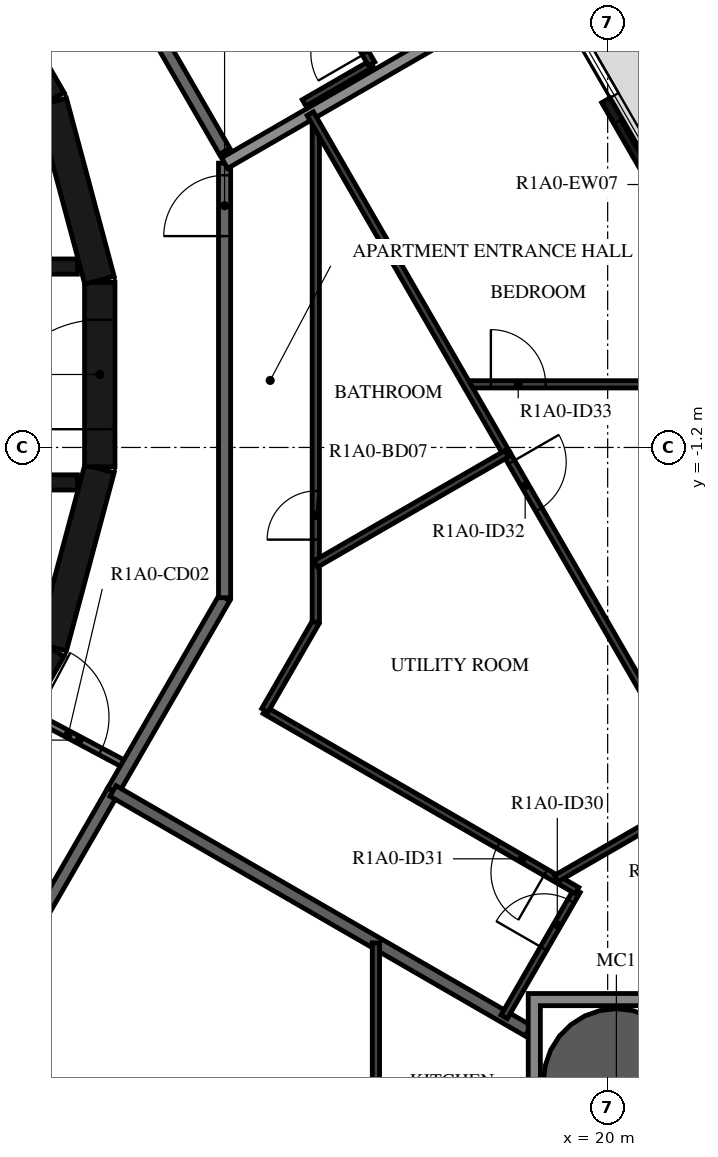
"""IFC4 building model, lengths in metres.
Left out: names, types, materials, properties, quantities, classifications, styles, units other than length and angle.
Written with IfcOpenShell. Run it as: python <this file> out.ifc"""

import sys

from ifc_helpers import new_model, si_unit, direction, frame, frame_2d, origin, origin_2d, place, context, subcontext, project, spatial, polyline, rectangle, hollow_circle, outline, extrude, element, fill, save


model = new_model("IFC4")
c1 = context("Model", 3, precision=1e-05, world=origin(), true_north=direction((0.0, 1.0)))
c2 = subcontext(c1, "Body", "Model", "MODEL_VIEW")
j1 = project(units=[si_unit("LENGTHUNIT", "METRE"), si_unit("PLANEANGLEUNIT", "RADIAN")], contexts=[c1])
p1 = place(None, origin())
s1 = spatial("IfcSite", under=j1, at=p1, CompositionType="ELEMENT")
p2 = place(p1, origin())
s2 = spatial("IfcBuilding", under=s1, at=p2, CompositionType="ELEMENT")
p3 = place(p2, frame((0.0, 0.0, 45.4)))
s3 = spatial("IfcBuildingStorey", under=s2, at=p3, CompositionType="ELEMENT", Elevation=45.4)
p4 = place(p3, frame((20.144, -11.63, -0.38), z_axis=(0.0, 0.0, 1.0), x_axis=(1.0, 0.0, 0.0)))
e1 = element("IfcColumn", 1, at=p4, inside=s3, PredefinedType="COLUMN", context=c2, shape_type="SweptSolid", body=[
    extrude(hollow_circle(Radius=1.2, WallThickness=0.06, at=origin_2d()), origin(), (0.0, 0.0, 1.0), 3.5),
])
p5 = place(p3, frame((21.571, 1.738, 0.0), z_axis=(0.0, 0.0, 1.0), x_axis=(-0.500028443584, 0.866008981251, 0.0)))
e2 = element("IfcWall", 2, at=p5, inside=s3, PredefinedType="STANDARD", context=c2, shape_type="SweptSolid", body=[
    extrude(rectangle(XDim=3.2, YDim=0.16, at=frame_2d((1.6, 0.0))), origin(), (0.0, 0.0, 1.0), 3.12),
])
p6 = place(p5, frame((0.4, 0.0, 0.0)))
e3 = element("IfcOpeningElement", 3, at=p6, cuts=e2, PredefinedType="OPENING", context=c2, shape_type="SweptSolid", body=[
    extrude(rectangle(XDim=2.4, YDim=2.4, at=frame_2d((1.2, 1.2))), frame((0.0, 0.09, 0.0), z_axis=(0.0, -1.0, 0.0), x_axis=(1.0, 0.0, 0.0)), (0.0, 0.0, 1.0), 0.18),
])
for number, where, z_axis, x_axis in (
    (4, (9.329, -7.137, 0.0), (0.0, 0.0, 1.0), (0.5, 0.866, 0.0)),
    (5, (10.858, -4.479, 0.0), (0.0, 0.0, 1.0), (0.259, 0.966, 0.0)),
):
    element("IfcWall", number, at=place(p3, frame(where, z_axis=z_axis, x_axis=x_axis)), inside=s3, PredefinedType="SHEAR", context=c2, shape_type="SweptSolid", body=[
        extrude(rectangle(XDim=3.033, YDim=0.5, at=frame_2d((1.516, 0.0))), origin(), (0.0, 0.0, 1.0), 3.12),
    ])
p7 = place(p3, frame((11.647, -1.516, 0.0), z_axis=(0.0, 0.0, 1.0), x_axis=(0.0, 1.0, 0.0)))
e6 = element("IfcWall", 6, at=p7, inside=s3, PredefinedType="SHEAR", context=c2, shape_type="SweptSolid", body=[
    extrude(rectangle(XDim=3.033, YDim=0.5, at=frame_2d((1.516, 0.0))), origin(), (0.0, 0.0, 1.0), 3.12),
])
p8 = place(p7, frame((0.616, 0.0, 0.0)))
e7 = element("IfcOpeningElement", 7, at=p8, cuts=e6, PredefinedType="OPENING", context=c2, shape_type="SweptSolid", body=[
    extrude(rectangle(XDim=1.8, YDim=2.1, at=frame_2d((0.9, 1.05))), frame((0.0, 0.26, 0.0), z_axis=(0.0, -1.0, 0.0), x_axis=(1.0, 0.0, 0.0)), (0.0, 0.0, 1.0), 0.52),
])
for number, where, z_axis, x_axis in (
    (8, (11.643, 1.55, 0.0), (0.0, 0.0, 1.0), (-0.259, 0.966, 0.0)),
    (9, (10.845, 4.51, 0.0), (0.0, 0.0, 1.0), (-0.5, 0.866, 0.0)),
):
    element("IfcWall", number, at=place(p3, frame(where, z_axis=z_axis, x_axis=x_axis)), inside=s3, PredefinedType="SHEAR", context=c2, shape_type="SweptSolid", body=[
        extrude(rectangle(XDim=3.033, YDim=0.5, at=frame_2d((1.516, 0.0))), origin(), (0.0, 0.0, 1.0), 3.12),
    ])
p9 = place(p3, frame((3.35, 1.775, 0.0), z_axis=(0.0, 0.0, 1.0), x_axis=(1.0, 0.0, 0.0)))
e10 = element("IfcWall", 10, at=p9, inside=s3, PredefinedType="SHEAR", context=c2, shape_type="SweptSolid", body=[
    extrude(rectangle(XDim=7.93, YDim=0.25, at=frame_2d((3.965, 0.0))), origin(), (0.0, 0.0, 1.0), 3.12),
])
p10 = place(p9, frame((0.35, 0.0, 0.0)))
e11 = element("IfcOpeningElement", 11, at=p10, cuts=e10, PredefinedType="OPENING", context=c2, shape_type="SweptSolid", body=[
    extrude(rectangle(XDim=1.2, YDim=2.4, at=frame_2d((0.6, 1.2))), frame((0.0, 0.135, 0.0), z_axis=(0.0, -1.0, 0.0), x_axis=(1.0, 0.0, 0.0)), (0.0, 0.0, 1.0), 0.27),
])
p11 = place(p9, frame((2.5, 0.0, 0.0)))
e12 = element("IfcOpeningElement", 12, at=p11, cuts=e10, PredefinedType="OPENING", context=c2, shape_type="SweptSolid", body=[
    extrude(rectangle(XDim=1.2, YDim=2.4, at=frame_2d((0.6, 1.2))), frame((0.0, 0.135, 0.0), z_axis=(0.0, -1.0, 0.0), x_axis=(1.0, 0.0, 0.0)), (0.0, 0.0, 1.0), 0.27),
])
p12 = place(p9, frame((4.8, 0.0, 0.0)))
e13 = element("IfcOpeningElement", 13, at=p12, cuts=e10, PredefinedType="OPENING", context=c2, shape_type="SweptSolid", body=[
    extrude(rectangle(XDim=0.9, YDim=2.1, at=frame_2d((0.45, 1.05))), frame((0.0, 0.135, 0.0), z_axis=(0.0, -1.0, 0.0), x_axis=(1.0, 0.0, 0.0)), (0.0, 0.0, 1.0), 0.27),
])
p13 = place(p3, frame((3.35, -1.775, 0.0), z_axis=(0.0, 0.0, 1.0), x_axis=(1.0, 0.0, 0.0)))
e14 = element("IfcWall", 14, at=p13, inside=s3, PredefinedType="SHEAR", context=c2, shape_type="SweptSolid", body=[
    extrude(rectangle(XDim=7.93, YDim=0.25, at=frame_2d((3.965, 0.0))), origin(), (0.0, 0.0, 1.0), 3.12),
])
p14 = place(p13, frame((0.4, 0.0, 0.0)))
e15 = element("IfcOpeningElement", 15, at=p14, cuts=e14, PredefinedType="OPENING", context=c2, shape_type="SweptSolid", body=[
    extrude(rectangle(XDim=1.1, YDim=2.4, at=frame_2d((0.55, 1.2))), frame((0.0, 0.135, 0.0), z_axis=(0.0, -1.0, 0.0), x_axis=(1.0, 0.0, 0.0)), (0.0, 0.0, 1.0), 0.27),
])
p15 = place(p13, frame((2.55, 0.0, 0.0)))
e16 = element("IfcOpeningElement", 16, at=p15, cuts=e14, PredefinedType="OPENING", context=c2, shape_type="SweptSolid", body=[
    extrude(rectangle(XDim=1.1, YDim=2.4, at=frame_2d((0.55, 1.2))), frame((0.0, 0.135, 0.0), z_axis=(0.0, -1.0, 0.0), x_axis=(1.0, 0.0, 0.0)), (0.0, 0.0, 1.0), 0.27),
])
p16 = place(p13, frame((4.7, 0.0, 0.0)))
e17 = element("IfcOpeningElement", 17, at=p16, cuts=e14, PredefinedType="OPENING", context=c2, shape_type="SweptSolid", body=[
    extrude(rectangle(XDim=1.1, YDim=2.4, at=frame_2d((0.55, 1.2))), frame((0.0, 0.135, 0.0), z_axis=(0.0, -1.0, 0.0), x_axis=(1.0, 0.0, 0.0)), (0.0, 0.0, 1.0), 0.27),
])
p17 = place(p3, frame((10.511, -5.589, 0.0), z_axis=(0.0, 0.0, 1.0), x_axis=(0.88294043061, -0.469485032769, 0.0)))
e18 = element("IfcWall", 18, at=p17, inside=s3, PredefinedType="PARTITIONING", context=c2, shape_type="SweptSolid", body=[
    extrude(rectangle(XDim=1.804, YDim=0.12, at=frame_2d((0.902, 0.0))), origin(), (0.0, 0.0, 1.0), 3.12),
])
p18 = place(p17, frame((0.1, 0.0, 0.0)))
e19 = element("IfcOpeningElement", 19, at=p18, cuts=e18, PredefinedType="OPENING", context=c2, shape_type="SweptSolid", body=[
    extrude(rectangle(XDim=1.2, YDim=2.1, at=frame_2d((0.6, 1.05))), frame((0.0, 0.07, 0.0), z_axis=(0.0, -1.0, 0.0), x_axis=(1.0, 0.0, 0.0)), (0.0, 0.0, 1.0), 0.14),
])
p19 = place(p3, frame((13.7, 3.671, 0.0), z_axis=(0.0, 0.0, 1.0), x_axis=(-0.500001669485, 0.866024439905, 0.0)))
e20 = element("IfcWall", 20, at=p19, inside=s3, PredefinedType="STANDARD", context=c2, shape_type="SweptSolid", body=[
    extrude(rectangle(XDim=7.342, YDim=0.2, at=frame_2d((3.671, 0.0))), origin(), (0.0, 0.0, 1.0), 3.12),
])
p20 = place(p19, frame((6.142, 0.0, 0.0)))
e21 = element("IfcOpeningElement", 21, at=p20, cuts=e20, PredefinedType="OPENING", context=c2, shape_type="SweptSolid", body=[
    extrude(rectangle(XDim=1.0, YDim=2.1, at=frame_2d((0.5, 1.05))), frame((0.0, 0.11, 0.0), z_axis=(0.0, -1.0, 0.0), x_axis=(1.0, 0.0, 0.0)), (0.0, 0.0, 1.0), 0.22),
])
p21 = place(p3, frame((11.865, -6.849, 0.0), z_axis=(0.0, 0.0, 1.0), x_axis=(0.500002704028, 0.866023842607, 0.0)))
e22 = element("IfcWall", 22, at=p21, inside=s3, PredefinedType="STANDARD", context=c2, shape_type="SweptSolid", body=[
    extrude(rectangle(XDim=3.67, YDim=0.2, at=frame_2d((1.835, 0.0))), origin(), (0.0, 0.0, 1.0), 3.12),
])
p22 = place(p3, frame((13.7, -3.671, 0.0), z_axis=(0.0, 0.0, 1.0), x_axis=(0.0, 1.0, 0.0)))
e23 = element("IfcWall", 23, at=p22, inside=s3, PredefinedType="STANDARD", context=c2, shape_type="SweptSolid", body=[
    extrude(rectangle(XDim=7.146, YDim=0.2, at=frame_2d((3.573, 0.0))), origin(), (0.0, 0.0, 1.0), 3.12),
])
p23 = place(p22, frame((5.947, 0.0, 0.0)))
e24 = element("IfcOpeningElement", 24, at=p23, cuts=e23, PredefinedType="OPENING", context=c2, shape_type="SweptSolid", body=[
    extrude(rectangle(XDim=1.0, YDim=2.1, at=frame_2d((0.5, 1.05))), frame((0.0, 0.11, 0.0), z_axis=(0.0, -1.0, 0.0), x_axis=(1.0, 0.0, 0.0)), (0.0, 0.0, 1.0), 0.22),
])
p24 = place(p3, frame((10.029, -10.029, 0.0), z_axis=(0.0, 0.0, 1.0), x_axis=(0.50001606911, 0.866016126081, 0.0)))
e25 = element("IfcWall", 25, at=p24, inside=s3, PredefinedType="STANDARD", context=c2, shape_type="SweptSolid", body=[
    extrude(rectangle(XDim=3.671, YDim=0.2, at=frame_2d((1.835, 0.0))), origin(), (0.0, 0.0, 1.0), 3.12),
])
p25 = place(p3, frame((13.7, 3.476, 0.0), z_axis=(0.0, 0.0, 1.0), x_axis=(0.866013584312, 0.500020471368, 0.0)))
e26 = element("IfcWall", 26, at=p25, inside=s3, PredefinedType="STANDARD", context=c2, shape_type="SweptSolid", body=[
    extrude(rectangle(XDim=6.028, YDim=0.2, at=frame_2d((3.014, 0.0))), origin(), (0.0, 0.0, 1.0), 2.73),
])
p26 = place(p3, frame((18.694, -10.793, 0.0), z_axis=(0.0, 0.0, 1.0), x_axis=(-0.865964895271, 0.500104789178, 0.0)))
e27 = element("IfcWall", 27, at=p26, inside=s3, PredefinedType="STANDARD", context=c2, shape_type="SweptSolid", body=[
    extrude(rectangle(XDim=7.885, YDim=0.2, at=frame_2d((3.943, 0.0))), origin(), (0.0, 0.0, 1.0), 3.12),
])
p27 = place(p3, frame((15.007, 4.467, 0.0), z_axis=(0.0, 0.0, 1.0), x_axis=(0.86599869919, 0.500046250861, 0.0)))
e28 = element("IfcWall", 28, at=p27, inside=s3, PredefinedType="PARTITIONING", context=c2, shape_type="SweptSolid", body=[
    extrude(rectangle(XDim=1.284, YDim=0.12, at=frame_2d((0.642, 0.0))), origin(), (0.0, 0.0, 1.0), 3.12),
])
p28 = place(p3, frame((16.119, 5.109, 0.0), z_axis=(0.0, 0.0, 1.0), x_axis=(-0.499988222896, 0.866032203192, 0.0)))
e29 = element("IfcWall", 29, at=p28, inside=s3, PredefinedType="PARTITIONING", context=c2, shape_type="SweptSolid", body=[
    extrude(rectangle(XDim=4.4, YDim=0.12, at=frame_2d((2.2, 0.0))), origin(), (0.0, 0.0, 1.0), 3.12),
])
p29 = place(p28, frame((0.2, 0.0, 0.0)))
e30 = element("IfcOpeningElement", 30, at=p29, cuts=e29, PredefinedType="OPENING", context=c2, shape_type="SweptSolid", body=[
    extrude(rectangle(XDim=0.9, YDim=2.1, at=frame_2d((0.45, 1.05))), frame((0.0, 0.07, 0.0), z_axis=(0.0, -1.0, 0.0), x_axis=(1.0, 0.0, 0.0)), (0.0, 0.0, 1.0), 0.14),
])
p30 = place(p3, frame((16.189, -15.23, 0.0), z_axis=(0.0, 0.0, 1.0), x_axis=(0.0, 1.0, 0.0)))
e31 = element("IfcWall", 31, at=p30, inside=s3, PredefinedType="PARTITIONING", context=c2, shape_type="SweptSolid", body=[
    extrude(rectangle(XDim=5.883, YDim=0.12, at=frame_2d((2.942, 0.0))), origin(), (0.0, 0.0, 1.0), 3.12),
])
p31 = place(p30, frame((0.2, 0.0, 0.0)))
e32 = element("IfcOpeningElement", 32, at=p31, cuts=e31, PredefinedType="OPENING", context=c2, shape_type="SweptSolid", body=[
    extrude(rectangle(XDim=0.9, YDim=2.1, at=frame_2d((0.45, 1.05))), frame((0.0, 0.07, 0.0), z_axis=(0.0, -1.0, 0.0), x_axis=(1.0, 0.0, 0.0)), (0.0, 0.0, 1.0), 0.14),
])
p32 = place(p3, frame((18.298, -10.564, 0.0), z_axis=(0.0, 0.0, 1.0), x_axis=(0.499960392047, 0.866048270239, 0.0)))
e33 = element("IfcWall", 33, at=p32, inside=s3, PredefinedType="PARTITIONING", context=c2, shape_type="SweptSolid", body=[
    extrude(rectangle(XDim=2.398, YDim=0.12, at=frame_2d((1.199, 0.0))), origin(), (0.0, 0.0, 1.0), 3.12),
])
p33 = place(p32, frame((1.298, 0.0, 0.0)))
e34 = element("IfcOpeningElement", 34, at=p33, cuts=e33, PredefinedType="OPENING", context=c2, shape_type="SweptSolid", body=[
    extrude(rectangle(XDim=0.9, YDim=2.1, at=frame_2d((0.45, 1.05))), frame((0.0, 0.07, 0.0), z_axis=(0.0, -1.0, 0.0), x_axis=(1.0, 0.0, 0.0)), (0.0, 0.0, 1.0), 0.14),
])
p34 = place(p3, frame((19.497, -8.487, 0.0), z_axis=(0.0, 0.0, 1.0), x_axis=(-0.866027165828, 0.499996948039, 0.0)))
e35 = element("IfcWall", 35, at=p34, inside=s3, PredefinedType="PARTITIONING", context=c2, shape_type="SweptSolid", body=[
    extrude(rectangle(XDim=5.928, YDim=0.12, at=frame_2d((2.964, 0.0))), origin(), (0.0, 0.0, 1.0), 3.12),
])
p35 = place(p34, frame((0.595, 0.0, 0.0)))
e36 = element("IfcOpeningElement", 36, at=p35, cuts=e35, PredefinedType="OPENING", context=c2, shape_type="SweptSolid", body=[
    extrude(rectangle(XDim=0.9, YDim=2.1, at=frame_2d((0.45, 1.05))), frame((0.0, 0.07, 0.0), z_axis=(0.0, -1.0, 0.0), x_axis=(1.0, 0.0, 0.0)), (0.0, 0.0, 1.0), 0.14),
])
p36 = place(p3, frame((14.363, -5.523, 0.0), z_axis=(0.0, 0.0, 1.0), x_axis=(0.499995851058, 0.866027799164, 0.0)))
e37 = element("IfcWall", 37, at=p36, inside=s3, PredefinedType="PARTITIONING", context=c2, shape_type="SweptSolid", body=[
    extrude(rectangle(XDim=1.675, YDim=0.12, at=frame_2d((0.837, 0.0))), origin(), (0.0, 0.0, 1.0), 3.12),
])
p37 = place(p3, frame((15.2, -4.073, 0.0), z_axis=(0.0, 0.0, 1.0), x_axis=(0.0, 1.0, 0.0)))
e38 = element("IfcWall", 38, at=p37, inside=s3, PredefinedType="PARTITIONING", context=c2, shape_type="SweptSolid", body=[
    extrude(rectangle(XDim=8.146, YDim=0.12, at=frame_2d((4.073, 0.0))), origin(), (0.0, 0.0, 1.0), 3.12),
])
p38 = place(p37, frame((1.357, 0.0, 0.0)))
e39 = element("IfcOpeningElement", 39, at=p38, cuts=e38, PredefinedType="OPENING", context=c2, shape_type="SweptSolid", body=[
    extrude(rectangle(XDim=0.8, YDim=2.1, at=frame_2d((0.4, 1.05))), frame((0.0, 0.07, 0.0), z_axis=(0.0, -1.0, 0.0), x_axis=(1.0, 0.0, 0.0)), (0.0, 0.0, 1.0), 0.14),
])
p39 = place(p3, frame((17.679, -0.162, 0.0), z_axis=(0.0, 0.0, 1.0), x_axis=(1.0, 0.0, 0.0)))
e40 = element("IfcWall", 40, at=p39, inside=s3, PredefinedType="PARTITIONING", context=c2, shape_type="SweptSolid", body=[
    extrude(rectangle(XDim=5.081, YDim=0.12, at=frame_2d((2.54, 0.0))), origin(), (0.0, 0.0, 1.0), 3.12),
])
p40 = place(p39, frame((0.4, 0.0, 0.0)))
e41 = element("IfcOpeningElement", 41, at=p40, cuts=e40, PredefinedType="OPENING", context=c2, shape_type="SweptSolid", body=[
    extrude(rectangle(XDim=0.9, YDim=2.1, at=frame_2d((0.45, 1.05))), frame((0.0, 0.07, 0.0), z_axis=(0.0, -1.0, 0.0), x_axis=(1.0, 0.0, 0.0)), (0.0, 0.0, 1.0), 0.14),
])
p41 = place(p3, frame((15.11, 4.289, 0.0), z_axis=(0.0, 0.0, 1.0), x_axis=(0.500001702147, -0.866024421047, 0.0)))
e42 = element("IfcWall", 42, at=p41, inside=s3, PredefinedType="PARTITIONING", context=c2, shape_type="SweptSolid", body=[
    extrude(rectangle(XDim=6.458, YDim=0.12, at=frame_2d((3.229, 0.0))), origin(), (0.0, 0.0, 1.0), 3.12),
])
p42 = place(p3, frame((18.339, -1.303, 0.0), z_axis=(0.0, 0.0, 1.0), x_axis=(0.499989127021, -0.866031681211, 0.0)))
e43 = element("IfcWall", 43, at=p42, inside=s3, PredefinedType="PARTITIONING", context=c2, shape_type="SweptSolid", body=[
    extrude(rectangle(XDim=9.589, YDim=0.12, at=frame_2d((4.794, 0.0))), origin(), (0.0, 0.0, 1.0), 3.12),
])
p43 = place(p42, frame((0.16, 0.0, 0.0)))
e44 = element("IfcOpeningElement", 44, at=p43, cuts=e43, PredefinedType="OPENING", context=c2, shape_type="SweptSolid", body=[
    extrude(rectangle(XDim=0.9, YDim=2.1, at=frame_2d((0.45, 1.05))), frame((0.0, 0.07, 0.0), z_axis=(0.0, -1.0, 0.0), x_axis=(1.0, 0.0, 0.0)), (0.0, 0.0, 1.0), 0.14),
])
p44 = place(p42, frame((6.618, 0.0, 0.0)))
e45 = element("IfcOpeningElement", 45, at=p44, cuts=e43, PredefinedType="OPENING", context=c2, shape_type="SweptSolid", body=[
    extrude(rectangle(XDim=0.9, YDim=2.1, at=frame_2d((0.45, 1.05))), frame((0.0, 0.07, 0.0), z_axis=(0.0, -1.0, 0.0), x_axis=(1.0, 0.0, 0.0)), (0.0, 0.0, 1.0), 0.14),
])
p45 = place(p3, frame((21.568, -6.896, 0.0), z_axis=(0.0, 0.0, 1.0), x_axis=(-0.866029478545, -0.499992942241, 0.0)))
e46 = element("IfcWall", 46, at=p45, inside=s3, PredefinedType="PARTITIONING", context=c2, shape_type="SweptSolid", body=[
    extrude(rectangle(XDim=2.787, YDim=0.12, at=frame_2d((1.393, 0.0))), origin(), (0.0, 0.0, 1.0), 3.12),
])
p46 = place(p3, frame((18.339, -1.303, 0.0), z_axis=(0.0, 0.0, 1.0), x_axis=(-0.866037510713, -0.499979029598, 0.0)))
e47 = element("IfcWall", 47, at=p46, inside=s3, PredefinedType="PARTITIONING", context=c2, shape_type="SweptSolid", body=[
    extrude(rectangle(XDim=3.624, YDim=0.12, at=frame_2d((1.812, 0.0))), origin(), (0.0, 0.0, 1.0), 3.12),
])
p47 = place(p3, origin())
e48 = element("IfcWall", 48, at=p47, inside=s3, PredefinedType="STANDARD", context=c2, shape_type="SweptSolid", body=[
    extrude(outline(polyline([(21.594, -10.18), (21.594, -13.08), (18.694, -13.08), (18.694, -10.18), (21.594, -10.18)]), holes=[polyline([(18.894, -12.88), (21.394, -12.88), (21.394, -10.38), (18.894, -10.38), (18.894, -12.88)])]), origin(), (0.0, 0.0, 1.0), 3.12),
])
p48 = place(p6, origin())
e49 = element("IfcDoor", 49, at=p48, inside=s3, OperationType="DOUBLE_DOOR_SLIDING", PredefinedType="DOOR", context=c2, shape_type="SweptSolid", body=[
    extrude(rectangle(XDim=2.4, YDim=2.4, at=frame_2d((1.2, 1.2))), frame((0.0, 0.025, 0.0), z_axis=(0.0, -1.0, 0.0), x_axis=(1.0, 0.0, 0.0)), (0.0, 0.0, 1.0), 0.05),
])
fill(e3, e49)
p49 = place(p8, origin())
e50 = element("IfcDoor", 50, at=p49, inside=s3, OperationType="DOUBLE_DOOR_SINGLE_SWING", PredefinedType="DOOR", context=c2, shape_type="SweptSolid", body=[
    extrude(rectangle(XDim=1.8, YDim=2.1, at=frame_2d((0.9, 1.05))), frame((0.0, 0.025, 0.0), z_axis=(0.0, -1.0, 0.0), x_axis=(1.0, 0.0, 0.0)), (0.0, 0.0, 1.0), 0.05),
])
fill(e7, e50)
p50 = place(p29, origin())
e51 = element("IfcDoor", 51, at=p50, inside=s3, OperationType="SINGLE_SWING_LEFT", PredefinedType="DOOR", context=c2, shape_type="SweptSolid", body=[
    extrude(rectangle(XDim=0.9, YDim=2.1, at=frame_2d((0.45, 1.05))), frame((0.0, 0.025, 0.0), z_axis=(0.0, -1.0, 0.0), x_axis=(1.0, 0.0, 0.0)), (0.0, 0.0, 1.0), 0.05),
])
fill(e30, e51)
p51 = place(p23, origin())
e52 = element("IfcDoor", 52, at=p51, inside=s3, OperationType="SINGLE_SWING_LEFT", PredefinedType="DOOR", context=c2, shape_type="SweptSolid", body=[
    extrude(rectangle(XDim=1.0, YDim=2.1, at=frame_2d((0.5, 1.05))), frame((0.0, 0.025, 0.0), z_axis=(0.0, -1.0, 0.0), x_axis=(1.0, 0.0, 0.0)), (0.0, 0.0, 1.0), 0.05),
])
fill(e24, e52)
p52 = place(p33, origin())
e53 = element("IfcDoor", 53, at=p52, inside=s3, OperationType="SINGLE_SWING_LEFT", PredefinedType="DOOR", context=c2, shape_type="SweptSolid", body=[
    extrude(rectangle(XDim=0.9, YDim=2.1, at=frame_2d((0.45, 1.05))), frame((0.0, 0.025, 0.0), z_axis=(0.0, -1.0, 0.0), x_axis=(1.0, 0.0, 0.0)), (0.0, 0.0, 1.0), 0.05),
])
fill(e34, e53)
p53 = place(p35, origin())
e54 = element("IfcDoor", 54, at=p53, inside=s3, OperationType="SINGLE_SWING_LEFT", PredefinedType="DOOR", context=c2, shape_type="SweptSolid", body=[
    extrude(rectangle(XDim=0.9, YDim=2.1, at=frame_2d((0.45, 1.05))), frame((0.0, 0.025, 0.0), z_axis=(0.0, -1.0, 0.0), x_axis=(1.0, 0.0, 0.0)), (0.0, 0.0, 1.0), 0.05),
])
fill(e36, e54)
p54 = place(p38, origin())
e55 = element("IfcDoor", 55, at=p54, inside=s3, OperationType="SINGLE_SWING_LEFT", PredefinedType="DOOR", context=c2, shape_type="SweptSolid", body=[
    extrude(rectangle(XDim=0.8, YDim=2.1, at=frame_2d((0.4, 1.05))), frame((0.0, 0.025, 0.0), z_axis=(0.0, -1.0, 0.0), x_axis=(1.0, 0.0, 0.0)), (0.0, 0.0, 1.0), 0.05),
])
fill(e39, e55)
p55 = place(p43, origin())
e56 = element("IfcDoor", 56, at=p55, inside=s3, OperationType="SINGLE_SWING_LEFT", PredefinedType="DOOR", context=c2, shape_type="SweptSolid", body=[
    extrude(rectangle(XDim=0.9, YDim=2.1, at=frame_2d((0.45, 1.05))), frame((0.0, 0.025, 0.0), z_axis=(0.0, -1.0, 0.0), x_axis=(1.0, 0.0, 0.0)), (0.0, 0.0, 1.0), 0.05),
])
fill(e44, e56)
p56 = place(p40, origin())
e57 = element("IfcDoor", 57, at=p56, inside=s3, OperationType="SINGLE_SWING_LEFT", PredefinedType="DOOR", context=c2, shape_type="SweptSolid", body=[
    extrude(rectangle(XDim=0.9, YDim=2.1, at=frame_2d((0.45, 1.05))), frame((0.0, 0.025, 0.0), z_axis=(0.0, -1.0, 0.0), x_axis=(1.0, 0.0, 0.0)), (0.0, 0.0, 1.0), 0.05),
])
fill(e41, e57)
p57 = place(p18, origin())
e58 = element("IfcDoor", 58, at=p57, inside=s3, OperationType="DOUBLE_DOOR_SINGLE_SWING", PredefinedType="DOOR", context=c2, shape_type="SweptSolid", body=[
    extrude(rectangle(XDim=1.2, YDim=2.1, at=frame_2d((0.6, 1.05))), frame((0.0, 0.025, 0.0), z_axis=(0.0, -1.0, 0.0), x_axis=(1.0, 0.0, 0.0)), (0.0, 0.0, 1.0), 0.05),
])
fill(e19, e58)
save(model, sys.argv[1])
